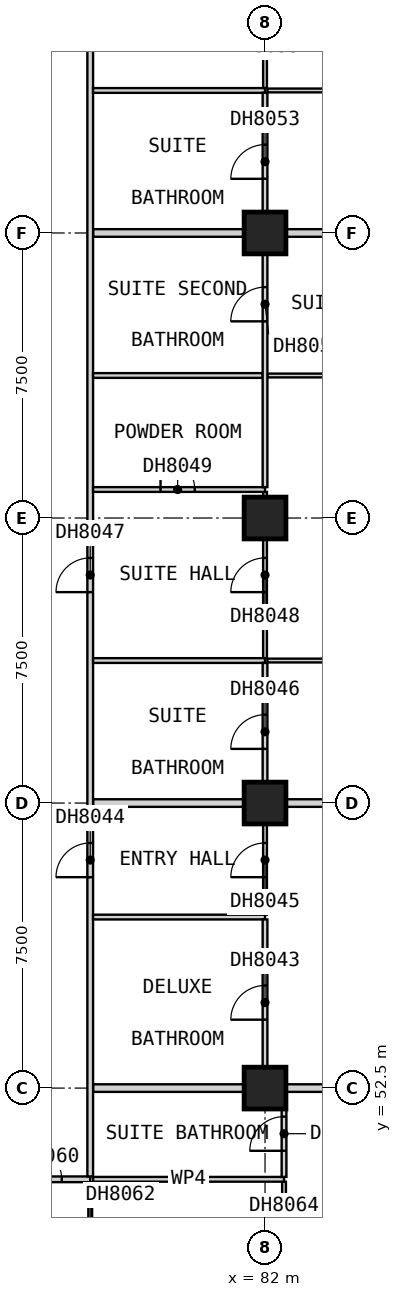
"""IFC4 building model, lengths in metres.
Left out: names, types, materials, properties, quantities, classifications, styles, units other than length and angle.
Written with IfcOpenShell. Run it as: python <this file> out.ifc"""

import sys

from ifc_helpers import new_model, si_unit, direction, frame, frame_2d, origin, origin_2d, place, context, subcontext, project, spatial, rectangle, extrude, element, fill, save


model = new_model("IFC4")
c1 = context("Model", 3, precision=1e-05, world=origin(), true_north=direction((0.0, 1.0)))
c2 = subcontext(c1, "Body", "Model", "MODEL_VIEW")
j1 = project(units=[si_unit("LENGTHUNIT", "METRE"), si_unit("PLANEANGLEUNIT", "RADIAN")], contexts=[c1])
p1 = place(None, origin())
s1 = spatial("IfcSite", under=j1, at=p1, CompositionType="ELEMENT")
p2 = place(p1, origin())
s2 = spatial("IfcBuilding", under=s1, at=p2, CompositionType="ELEMENT")
p3 = place(p2, frame((0.0, 0.0, 89.9)))
s3 = spatial("IfcBuildingStorey", under=s2, at=p3, CompositionType="ELEMENT", Elevation=89.9)
for number, where, z_axis, x_axis in (
    (1, (82.0, 52.5, 0.0), (0.0, 0.0, 1.0), (1.0, 0.0, 0.0)),
    (2, (82.0, 60.0, 0.0), (0.0, 0.0, 1.0), (1.0, 0.0, 0.0)),
    (3, (82.0, 67.5, 0.0), (0.0, 0.0, 1.0), (1.0, 0.0, 0.0)),
    (4, (82.0, 75.0, 0.0), (0.0, 0.0, 1.0), (1.0, 0.0, 0.0)),
):
    element("IfcColumn", number, at=place(p3, frame(where, z_axis=z_axis, x_axis=x_axis)), inside=s3, PredefinedType="COLUMN", context=c2, shape_type="SweptSolid", body=[
        extrude(rectangle(XDim=1.1, YDim=1.1, at=origin_2d()), origin(), (0.0, 0.0, 1.0), 3.6),
    ])
for number, where, z_axis, x_axis in (
    (5, (77.475, 52.5, 0.0), (0.0, 0.0, 1.0), (1.0, 0.0, 0.0)),
    (6, (77.475, 60.0, 0.0), (0.0, 0.0, 1.0), (1.0, 0.0, 0.0)),
    (7, (77.475, 75.0, 0.0), (0.0, 0.0, 1.0), (1.0, 0.0, 0.0)),
):
    element("IfcWall", number, at=place(p3, frame(where, z_axis=z_axis, x_axis=x_axis)), inside=s3, PredefinedType="PARTITIONING", context=c2, shape_type="SweptSolid", body=[
        extrude(rectangle(XDim=12.525, YDim=0.2, at=frame_2d((6.262, 0.0))), origin(), (0.0, 0.0, 1.0), 3.35),
    ])
p4 = place(p3, frame((33.75, 50.1, 0.0), z_axis=(0.0, 0.0, 1.0), x_axis=(1.0, 0.0, 0.0)))
e8 = element("IfcWall", 8, at=p4, inside=s3, PredefinedType="PARTITIONING", context=c2, shape_type="SweptSolid", body=[
    extrude(rectangle(XDim=43.65, YDim=0.15, at=frame_2d((21.825, 0.0))), origin(), (0.0, 0.0, 1.0), 3.35),
])
p5 = place(p4, frame((5.175, 0.0, 0.0)))
e9 = element("IfcOpeningElement", 9, at=p5, cuts=e8, PredefinedType="OPENING", context=c2, shape_type="SweptSolid", body=[
    extrude(rectangle(XDim=0.9, YDim=2.1, at=frame_2d((0.45, 1.05))), frame((0.0, 0.085, 0.0), z_axis=(0.0, -1.0, 0.0), x_axis=(1.0, 0.0, 0.0)), (0.0, 0.0, 1.0), 0.17),
])
p6 = place(p4, frame((13.05, 0.0, 0.0)))
e10 = element("IfcOpeningElement", 10, at=p6, cuts=e8, PredefinedType="OPENING", context=c2, shape_type="SweptSolid", body=[
    extrude(rectangle(XDim=0.9, YDim=2.1, at=frame_2d((0.45, 1.05))), frame((0.0, 0.085, 0.0), z_axis=(0.0, -1.0, 0.0), x_axis=(1.0, 0.0, 0.0)), (0.0, 0.0, 1.0), 0.17),
])
p7 = place(p4, frame((17.363, 0.0, 0.0)))
e11 = element("IfcOpeningElement", 11, at=p7, cuts=e8, PredefinedType="OPENING", context=c2, shape_type="SweptSolid", body=[
    extrude(rectangle(XDim=0.9, YDim=2.1, at=frame_2d((0.45, 1.05))), frame((0.0, 0.085, 0.0), z_axis=(0.0, -1.0, 0.0), x_axis=(1.0, 0.0, 0.0)), (0.0, 0.0, 1.0), 0.17),
])
p8 = place(p4, frame((21.113, 0.0, 0.0)))
e12 = element("IfcOpeningElement", 12, at=p8, cuts=e8, PredefinedType="OPENING", context=c2, shape_type="SweptSolid", body=[
    extrude(rectangle(XDim=0.9, YDim=2.1, at=frame_2d((0.45, 1.05))), frame((0.0, 0.085, 0.0), z_axis=(0.0, -1.0, 0.0), x_axis=(1.0, 0.0, 0.0)), (0.0, 0.0, 1.0), 0.17),
])
p9 = place(p4, frame((28.05, 0.0, 0.0)))
e13 = element("IfcOpeningElement", 13, at=p9, cuts=e8, PredefinedType="OPENING", context=c2, shape_type="SweptSolid", body=[
    extrude(rectangle(XDim=0.9, YDim=2.1, at=frame_2d((0.45, 1.05))), frame((0.0, 0.085, 0.0), z_axis=(0.0, -1.0, 0.0), x_axis=(1.0, 0.0, 0.0)), (0.0, 0.0, 1.0), 0.17),
])
p10 = place(p4, frame((32.363, 0.0, 0.0)))
e14 = element("IfcOpeningElement", 14, at=p10, cuts=e8, PredefinedType="OPENING", context=c2, shape_type="SweptSolid", body=[
    extrude(rectangle(XDim=0.9, YDim=2.1, at=frame_2d((0.45, 1.05))), frame((0.0, 0.085, 0.0), z_axis=(0.0, -1.0, 0.0), x_axis=(1.0, 0.0, 0.0)), (0.0, 0.0, 1.0), 0.17),
])
p11 = place(p4, frame((39.3, 0.0, 0.0)))
e15 = element("IfcOpeningElement", 15, at=p11, cuts=e8, PredefinedType="OPENING", context=c2, shape_type="SweptSolid", body=[
    extrude(rectangle(XDim=0.9, YDim=2.1, at=frame_2d((0.45, 1.05))), frame((0.0, 0.085, 0.0), z_axis=(0.0, -1.0, 0.0), x_axis=(1.0, 0.0, 0.0)), (0.0, 0.0, 1.0), 0.17),
])
p12 = place(p4, frame((42.0, 0.0, 0.0)))
e16 = element("IfcOpeningElement", 16, at=p12, cuts=e8, PredefinedType="OPENING", context=c2, shape_type="SweptSolid", body=[
    extrude(rectangle(XDim=0.9, YDim=2.1, at=frame_2d((0.45, 1.05))), frame((0.0, 0.085, 0.0), z_axis=(0.0, -1.0, 0.0), x_axis=(1.0, 0.0, 0.0)), (0.0, 0.0, 1.0), 0.17),
])
p13 = place(p3, frame((77.4, 50.175, 0.0), z_axis=(0.0, 0.0, 1.0), x_axis=(0.0, 1.0, 0.0)))
e17 = element("IfcWall", 17, at=p13, inside=s3, PredefinedType="PARTITIONING", context=c2, shape_type="SweptSolid", body=[
    extrude(rectangle(XDim=42.15, YDim=0.15, at=frame_2d((21.075, 0.0))), origin(), (0.0, 0.0, 1.0), 3.35),
])
p14 = place(p13, frame((7.875, 0.0, 0.0)))
e18 = element("IfcOpeningElement", 18, at=p14, cuts=e17, PredefinedType="OPENING", context=c2, shape_type="SweptSolid", body=[
    extrude(rectangle(XDim=0.9, YDim=2.1, at=frame_2d((0.45, 1.05))), frame((0.0, 0.085, 0.0), z_axis=(0.0, -1.0, 0.0), x_axis=(1.0, 0.0, 0.0)), (0.0, 0.0, 1.0), 0.17),
])
p15 = place(p13, frame((15.375, 0.0, 0.0)))
e19 = element("IfcOpeningElement", 19, at=p15, cuts=e17, PredefinedType="OPENING", context=c2, shape_type="SweptSolid", body=[
    extrude(rectangle(XDim=0.9, YDim=2.1, at=frame_2d((0.45, 1.05))), frame((0.0, 0.085, 0.0), z_axis=(0.0, -1.0, 0.0), x_axis=(1.0, 0.0, 0.0)), (0.0, 0.0, 1.0), 0.17),
])
p16 = place(p13, frame((30.375, 0.0, 0.0)))
e20 = element("IfcOpeningElement", 20, at=p16, cuts=e17, PredefinedType="OPENING", context=c2, shape_type="SweptSolid", body=[
    extrude(rectangle(XDim=0.9, YDim=2.1, at=frame_2d((0.45, 1.05))), frame((0.0, 0.085, 0.0), z_axis=(0.0, -1.0, 0.0), x_axis=(1.0, 0.0, 0.0)), (0.0, 0.0, 1.0), 0.17),
])
p17 = place(p3, frame((82.062, 63.75, 0.0), z_axis=(0.0, 0.0, 1.0), x_axis=(1.0, 0.0, 0.0)))
e21 = element("IfcWall", 21, at=p17, inside=s3, PredefinedType="PARTITIONING", context=c2, shape_type="SweptSolid", body=[
    extrude(rectangle(XDim=7.127, YDim=0.1, at=frame_2d((3.564, 0.0))), origin(), (0.0, 0.0, 1.0), 3.35),
])
p18 = place(p17, frame((3.488, 0.0, 0.0)))
e22 = element("IfcOpeningElement", 22, at=p18, cuts=e21, PredefinedType="OPENING", context=c2, shape_type="SweptSolid", body=[
    extrude(rectangle(XDim=0.9, YDim=2.1, at=frame_2d((0.45, 1.05))), frame((0.0, 0.06, 0.0), z_axis=(0.0, -1.0, 0.0), x_axis=(1.0, 0.0, 0.0)), (0.0, 0.0, 1.0), 0.12),
])
p19 = place(p3, frame((82.062, 71.25, 0.0), z_axis=(0.0, 0.0, 1.0), x_axis=(1.0, 0.0, 0.0)))
e23 = element("IfcWall", 23, at=p19, inside=s3, PredefinedType="PARTITIONING", context=c2, shape_type="SweptSolid", body=[
    extrude(rectangle(XDim=7.127, YDim=0.1, at=frame_2d((3.564, 0.0))), origin(), (0.0, 0.0, 1.0), 3.35),
])
p20 = place(p19, frame((3.488, 0.0, 0.0)))
e24 = element("IfcOpeningElement", 24, at=p20, cuts=e23, PredefinedType="OPENING", context=c2, shape_type="SweptSolid", body=[
    extrude(rectangle(XDim=0.9, YDim=2.1, at=frame_2d((0.45, 1.05))), frame((0.0, 0.06, 0.0), z_axis=(0.0, -1.0, 0.0), x_axis=(1.0, 0.0, 0.0)), (0.0, 0.0, 1.0), 0.12),
])
p21 = place(p3, frame((82.062, 78.75, 0.0), z_axis=(0.0, 0.0, 1.0), x_axis=(1.0, 0.0, 0.0)))
e25 = element("IfcWall", 25, at=p21, inside=s3, PredefinedType="PARTITIONING", context=c2, shape_type="SweptSolid", body=[
    extrude(rectangle(XDim=7.127, YDim=0.1, at=frame_2d((3.564, 0.0))), origin(), (0.0, 0.0, 1.0), 3.35),
])
p22 = place(p21, frame((3.488, 0.0, 0.0)))
e26 = element("IfcOpeningElement", 26, at=p22, cuts=e25, PredefinedType="OPENING", context=c2, shape_type="SweptSolid", body=[
    extrude(rectangle(XDim=0.9, YDim=2.1, at=frame_2d((0.45, 1.05))), frame((0.0, 0.06, 0.0), z_axis=(0.0, -1.0, 0.0), x_axis=(1.0, 0.0, 0.0)), (0.0, 0.0, 1.0), 0.12),
])
p23 = place(p3, frame((77.4, 46.55, 0.0), z_axis=(0.0, 0.0, 1.0), x_axis=(0.0, 1.0, 0.0)))
e27 = element("IfcWall", 27, at=p23, inside=s3, PredefinedType="PARTITIONING", context=c2, shape_type="SweptSolid", body=[
    extrude(rectangle(XDim=3.475, YDim=0.1, at=frame_2d((1.737, 0.0))), origin(), (0.0, 0.0, 1.0), 3.35),
])
p24 = place(p23, frame((1.3, 0.0, 0.0)))
e28 = element("IfcOpeningElement", 28, at=p24, cuts=e27, PredefinedType="OPENING", context=c2, shape_type="SweptSolid", body=[
    extrude(rectangle(XDim=0.9, YDim=2.1, at=frame_2d((0.45, 1.05))), frame((0.0, 0.06, 0.0), z_axis=(0.0, -1.0, 0.0), x_axis=(1.0, 0.0, 0.0)), (0.0, 0.0, 1.0), 0.12),
])
p25 = place(p3, frame((82.0, 57.062, 0.0), z_axis=(0.0, 0.0, 1.0), x_axis=(0.0, 1.0, 0.0)))
e29 = element("IfcWall", 29, at=p25, inside=s3, PredefinedType="PARTITIONING", context=c2, shape_type="SweptSolid", body=[
    extrude(rectangle(XDim=2.837, YDim=0.1, at=frame_2d((1.419, 0.0))), origin(), (0.0, 0.0, 1.0), 3.35),
])
p26 = place(p25, frame((0.988, 0.0, 0.0)))
e30 = element("IfcOpeningElement", 30, at=p26, cuts=e29, PredefinedType="OPENING", context=c2, shape_type="SweptSolid", body=[
    extrude(rectangle(XDim=0.9, YDim=2.1, at=frame_2d((0.45, 1.05))), frame((0.0, 0.06, 0.0), z_axis=(0.0, -1.0, 0.0), x_axis=(1.0, 0.0, 0.0)), (0.0, 0.0, 1.0), 0.12),
])
p27 = place(p3, frame((82.0, 63.812, 0.0), z_axis=(0.0, 0.0, 1.0), x_axis=(0.0, 1.0, 0.0)))
e31 = element("IfcWall", 31, at=p27, inside=s3, PredefinedType="PARTITIONING", context=c2, shape_type="SweptSolid", body=[
    extrude(rectangle(XDim=4.375, YDim=0.1, at=frame_2d((2.188, 0.0))), origin(), (0.0, 0.0, 1.0), 3.35),
])
p28 = place(p27, frame((1.738, 0.0, 0.0)))
e32 = element("IfcOpeningElement", 32, at=p28, cuts=e31, PredefinedType="OPENING", context=c2, shape_type="SweptSolid", body=[
    extrude(rectangle(XDim=0.9, YDim=2.1, at=frame_2d((0.45, 1.05))), frame((0.0, 0.06, 0.0), z_axis=(0.0, -1.0, 0.0), x_axis=(1.0, 0.0, 0.0)), (0.0, 0.0, 1.0), 0.12),
])
p29 = place(p3, frame((82.0, 78.812, 0.0), z_axis=(0.0, 0.0, 1.0), x_axis=(0.0, 1.0, 0.0)))
e33 = element("IfcWall", 33, at=p29, inside=s3, PredefinedType="PARTITIONING", context=c2, shape_type="SweptSolid", body=[
    extrude(rectangle(XDim=4.375, YDim=0.1, at=frame_2d((2.188, 0.0))), origin(), (0.0, 0.0, 1.0), 3.35),
])
p30 = place(p29, frame((1.738, 0.0, 0.0)))
e34 = element("IfcOpeningElement", 34, at=p30, cuts=e33, PredefinedType="OPENING", context=c2, shape_type="SweptSolid", body=[
    extrude(rectangle(XDim=0.9, YDim=2.1, at=frame_2d((0.45, 1.05))), frame((0.0, 0.06, 0.0), z_axis=(0.0, -1.0, 0.0), x_axis=(1.0, 0.0, 0.0)), (0.0, 0.0, 1.0), 0.12),
])
p31 = place(p3, frame((82.5, 38.31, 0.0), z_axis=(0.0, 0.0, 1.0), x_axis=(0.0, 1.0, 0.0)))
e35 = element("IfcWall", 35, at=p31, inside=s3, PredefinedType="PARTITIONING", context=c2, shape_type="SweptSolid", body=[
    extrude(rectangle(XDim=11.728, YDim=0.1, at=frame_2d((5.864, 0.0))), origin(), (0.0, 0.0, 1.0), 3.35),
])
p32 = place(p31, frame((0.99, 0.0, 0.0)))
e36 = element("IfcOpeningElement", 36, at=p32, cuts=e35, PredefinedType="OPENING", context=c2, shape_type="SweptSolid", body=[
    extrude(rectangle(XDim=0.9, YDim=2.1, at=frame_2d((0.45, 1.05))), frame((0.0, 0.06, 0.0), z_axis=(0.0, -1.0, 0.0), x_axis=(1.0, 0.0, 0.0)), (0.0, 0.0, 1.0), 0.12),
])
p33 = place(p31, frame((9.54, 0.0, 0.0)))
e37 = element("IfcOpeningElement", 37, at=p33, cuts=e35, PredefinedType="OPENING", context=c2, shape_type="SweptSolid", body=[
    extrude(rectangle(XDim=0.9, YDim=2.1, at=frame_2d((0.45, 1.05))), frame((0.0, 0.06, 0.0), z_axis=(0.0, -1.0, 0.0), x_axis=(1.0, 0.0, 0.0)), (0.0, 0.0, 1.0), 0.12),
])
p34 = place(p3, frame((77.475, 50.1, 0.0), z_axis=(0.0, 0.0, 1.0), x_axis=(1.0, 0.0, 0.0)))
e38 = element("IfcWall", 38, at=p34, inside=s3, PredefinedType="PARTITIONING", context=c2, shape_type="SweptSolid", body=[
    extrude(rectangle(XDim=5.025, YDim=0.125, at=frame_2d((2.512, 0.0))), origin(), (0.0, 0.0, 1.0), 3.35),
])
for number, where, z_axis, x_axis in (
    (39, (77.475, 57.0, 0.0), (0.0, 0.0, 1.0), (1.0, 0.0, 0.0)),
    (40, (77.475, 63.75, 0.0), (0.0, 0.0, 1.0), (1.0, 0.0, 0.0)),
):
    element("IfcWall", number, at=place(p3, frame(where, z_axis=z_axis, x_axis=x_axis)), inside=s3, PredefinedType="PARTITIONING", context=c2, shape_type="SweptSolid", body=[
        extrude(rectangle(XDim=4.525, YDim=0.125, at=frame_2d((2.262, 0.0))), origin(), (0.0, 0.0, 1.0), 3.35),
    ])
p35 = place(p3, frame((77.475, 68.25, 0.0), z_axis=(0.0, 0.0, 1.0), x_axis=(1.0, 0.0, 0.0)))
e41 = element("IfcWall", 41, at=p35, inside=s3, PredefinedType="PARTITIONING", context=c2, shape_type="SweptSolid", body=[
    extrude(rectangle(XDim=4.525, YDim=0.125, at=frame_2d((2.262, 0.0))), origin(), (0.0, 0.0, 1.0), 3.35),
])
p36 = place(p35, frame((1.775, 0.0, 0.0)))
e42 = element("IfcOpeningElement", 42, at=p36, cuts=e41, PredefinedType="OPENING", context=c2, shape_type="SweptSolid", body=[
    extrude(rectangle(XDim=0.9, YDim=2.1, at=frame_2d((0.45, 1.05))), frame((0.0, 0.073, 0.0), z_axis=(0.0, -1.0, 0.0), x_axis=(1.0, 0.0, 0.0)), (0.0, 0.0, 1.0), 0.145),
])
p37 = place(p3, frame((77.475, 71.25, 0.0), z_axis=(0.0, 0.0, 1.0), x_axis=(1.0, 0.0, 0.0)))
e43 = element("IfcWall", 43, at=p37, inside=s3, PredefinedType="PARTITIONING", context=c2, shape_type="SweptSolid", body=[
    extrude(rectangle(XDim=4.462, YDim=0.125, at=frame_2d((2.231, 0.0))), origin(), (0.0, 0.0, 1.0), 3.35),
])
p38 = place(p3, frame((77.475, 78.75, 0.0), z_axis=(0.0, 0.0, 1.0), x_axis=(1.0, 0.0, 0.0)))
e44 = element("IfcWall", 44, at=p38, inside=s3, PredefinedType="PARTITIONING", context=c2, shape_type="SweptSolid", body=[
    extrude(rectangle(XDim=4.525, YDim=0.125, at=frame_2d((2.262, 0.0))), origin(), (0.0, 0.0, 1.0), 3.35),
])
p39 = place(p3, frame((82.0, 52.6, 0.0), z_axis=(0.0, 0.0, 1.0), x_axis=(0.0, 1.0, 0.0)))
e45 = element("IfcWall", 45, at=p39, inside=s3, PredefinedType="PARTITIONING", context=c2, shape_type="SweptSolid", body=[
    extrude(rectangle(XDim=4.337, YDim=0.125, at=frame_2d((2.169, 0.0))), origin(), (0.0, 0.0, 1.0), 3.35),
])
p40 = place(p39, frame((1.7, 0.0, 0.0)))
e46 = element("IfcOpeningElement", 46, at=p40, cuts=e45, PredefinedType="OPENING", context=c2, shape_type="SweptSolid", body=[
    extrude(rectangle(XDim=0.9, YDim=2.1, at=frame_2d((0.45, 1.05))), frame((0.0, 0.073, 0.0), z_axis=(0.0, -1.0, 0.0), x_axis=(1.0, 0.0, 0.0)), (0.0, 0.0, 1.0), 0.145),
])
p41 = place(p3, frame((82.0, 60.1, 0.0), z_axis=(0.0, 0.0, 1.0), x_axis=(0.0, 1.0, 0.0)))
e47 = element("IfcWall", 47, at=p41, inside=s3, PredefinedType="PARTITIONING", context=c2, shape_type="SweptSolid", body=[
    extrude(rectangle(XDim=3.587, YDim=0.125, at=frame_2d((1.794, 0.0))), origin(), (0.0, 0.0, 1.0), 3.35),
])
p42 = place(p41, frame((1.325, 0.0, 0.0)))
e48 = element("IfcOpeningElement", 48, at=p42, cuts=e47, PredefinedType="OPENING", context=c2, shape_type="SweptSolid", body=[
    extrude(rectangle(XDim=0.9, YDim=2.1, at=frame_2d((0.45, 1.05))), frame((0.0, 0.073, 0.0), z_axis=(0.0, -1.0, 0.0), x_axis=(1.0, 0.0, 0.0)), (0.0, 0.0, 1.0), 0.145),
])
p43 = place(p3, frame((82.0, 68.312, 0.0), z_axis=(0.0, 0.0, 1.0), x_axis=(0.0, 1.0, 0.0)))
e49 = element("IfcWall", 49, at=p43, inside=s3, PredefinedType="PARTITIONING", context=c2, shape_type="SweptSolid", body=[
    extrude(rectangle(XDim=10.375, YDim=0.125, at=frame_2d((5.188, 0.0))), origin(), (0.0, 0.0, 1.0), 3.35),
])
p44 = place(p43, frame((4.363, 0.0, 0.0)))
e50 = element("IfcOpeningElement", 50, at=p44, cuts=e49, PredefinedType="OPENING", context=c2, shape_type="SweptSolid", body=[
    extrude(rectangle(XDim=0.9, YDim=2.1, at=frame_2d((0.45, 1.05))), frame((0.0, 0.073, 0.0), z_axis=(0.0, -1.0, 0.0), x_axis=(1.0, 0.0, 0.0)), (0.0, 0.0, 1.0), 0.145),
])
p45 = place(p43, frame((8.113, 0.0, 0.0)))
e51 = element("IfcOpeningElement", 51, at=p45, cuts=e49, PredefinedType="OPENING", context=c2, shape_type="SweptSolid", body=[
    extrude(rectangle(XDim=0.9, YDim=2.1, at=frame_2d((0.45, 1.05))), frame((0.0, 0.073, 0.0), z_axis=(0.0, -1.0, 0.0), x_axis=(1.0, 0.0, 0.0)), (0.0, 0.0, 1.0), 0.145),
])
p46 = place(p3, frame((82.5, 50.163, 0.0), z_axis=(0.0, 0.0, 1.0), x_axis=(0.0, 1.0, 0.0)))
e52 = element("IfcWall", 52, at=p46, inside=s3, PredefinedType="PARTITIONING", context=c2, shape_type="SweptSolid", body=[
    extrude(rectangle(XDim=2.237, YDim=0.125, at=frame_2d((1.119, 0.0))), origin(), (0.0, 0.0, 1.0), 3.35),
])
p47 = place(p46, frame((0.688, 0.0, 0.0)))
e53 = element("IfcOpeningElement", 53, at=p47, cuts=e52, PredefinedType="OPENING", context=c2, shape_type="SweptSolid", body=[
    extrude(rectangle(XDim=0.9, YDim=2.1, at=frame_2d((0.45, 1.05))), frame((0.0, 0.073, 0.0), z_axis=(0.0, -1.0, 0.0), x_axis=(1.0, 0.0, 0.0)), (0.0, 0.0, 1.0), 0.145),
])
p48 = place(p40, origin())
e54 = element("IfcDoor", 54, at=p48, inside=s3, OperationType="SINGLE_SWING_LEFT", PredefinedType="DOOR", context=c2, shape_type="SweptSolid", body=[
    extrude(rectangle(XDim=0.9, YDim=2.1, at=frame_2d((0.45, 1.05))), frame((0.0, 0.025, 0.0), z_axis=(0.0, -1.0, 0.0), x_axis=(1.0, 0.0, 0.0)), (0.0, 0.0, 1.0), 0.05),
])
fill(e46, e54)
p49 = place(p14, origin())
e55 = element("IfcDoor", 55, at=p49, inside=s3, OperationType="SINGLE_SWING_RIGHT", PredefinedType="DOOR", context=c2, shape_type="SweptSolid", body=[
    extrude(rectangle(XDim=0.9, YDim=2.1, at=frame_2d((0.45, 1.05))), frame((0.0, 0.025, 0.0), z_axis=(0.0, -1.0, 0.0), x_axis=(1.0, 0.0, 0.0)), (0.0, 0.0, 1.0), 0.05),
])
fill(e18, e55)
p50 = place(p26, origin())
e56 = element("IfcDoor", 56, at=p50, inside=s3, OperationType="SINGLE_SWING_LEFT", PredefinedType="DOOR", context=c2, shape_type="SweptSolid", body=[
    extrude(rectangle(XDim=0.9, YDim=2.1, at=frame_2d((0.45, 1.05))), frame((0.0, 0.025, 0.0), z_axis=(0.0, -1.0, 0.0), x_axis=(1.0, 0.0, 0.0)), (0.0, 0.0, 1.0), 0.05),
])
fill(e30, e56)
p51 = place(p42, origin())
e57 = element("IfcDoor", 57, at=p51, inside=s3, OperationType="SINGLE_SWING_LEFT", PredefinedType="DOOR", context=c2, shape_type="SweptSolid", body=[
    extrude(rectangle(XDim=0.9, YDim=2.1, at=frame_2d((0.45, 1.05))), frame((0.0, 0.025, 0.0), z_axis=(0.0, -1.0, 0.0), x_axis=(1.0, 0.0, 0.0)), (0.0, 0.0, 1.0), 0.05),
])
fill(e48, e57)
p52 = place(p15, origin())
e58 = element("IfcDoor", 58, at=p52, inside=s3, OperationType="SINGLE_SWING_RIGHT", PredefinedType="DOOR", context=c2, shape_type="SweptSolid", body=[
    extrude(rectangle(XDim=0.9, YDim=2.1, at=frame_2d((0.45, 1.05))), frame((0.0, 0.025, 0.0), z_axis=(0.0, -1.0, 0.0), x_axis=(1.0, 0.0, 0.0)), (0.0, 0.0, 1.0), 0.05),
])
fill(e19, e58)
p53 = place(p28, origin())
e59 = element("IfcDoor", 59, at=p53, inside=s3, OperationType="SINGLE_SWING_LEFT", PredefinedType="DOOR", context=c2, shape_type="SweptSolid", body=[
    extrude(rectangle(XDim=0.9, YDim=2.1, at=frame_2d((0.45, 1.05))), frame((0.0, 0.025, 0.0), z_axis=(0.0, -1.0, 0.0), x_axis=(1.0, 0.0, 0.0)), (0.0, 0.0, 1.0), 0.05),
])
fill(e32, e59)
p54 = place(p36, origin())
e60 = element("IfcDoor", 60, at=p54, inside=s3, OperationType="SINGLE_SWING_RIGHT", PredefinedType="DOOR", context=c2, shape_type="SweptSolid", body=[
    extrude(rectangle(XDim=0.9, YDim=2.1, at=frame_2d((0.45, 1.05))), frame((0.0, 0.025, 0.0), z_axis=(0.0, -1.0, 0.0), x_axis=(1.0, 0.0, 0.0)), (0.0, 0.0, 1.0), 0.05),
])
fill(e42, e60)
p55 = place(p44, origin())
e61 = element("IfcDoor", 61, at=p55, inside=s3, OperationType="SINGLE_SWING_LEFT", PredefinedType="DOOR", context=c2, shape_type="SweptSolid", body=[
    extrude(rectangle(XDim=0.9, YDim=2.1, at=frame_2d((0.45, 1.05))), frame((0.0, 0.025, 0.0), z_axis=(0.0, -1.0, 0.0), x_axis=(1.0, 0.0, 0.0)), (0.0, 0.0, 1.0), 0.05),
])
fill(e50, e61)
p56 = place(p45, origin())
e62 = element("IfcDoor", 62, at=p56, inside=s3, OperationType="SINGLE_SWING_LEFT", PredefinedType="DOOR", context=c2, shape_type="SweptSolid", body=[
    extrude(rectangle(XDim=0.9, YDim=2.1, at=frame_2d((0.45, 1.05))), frame((0.0, 0.025, 0.0), z_axis=(0.0, -1.0, 0.0), x_axis=(1.0, 0.0, 0.0)), (0.0, 0.0, 1.0), 0.05),
])
fill(e51, e62)
p57 = place(p12, origin())
e63 = element("IfcDoor", 63, at=p57, inside=s3, OperationType="SINGLE_SWING_LEFT", PredefinedType="DOOR", context=c2, shape_type="SweptSolid", body=[
    extrude(rectangle(XDim=0.9, YDim=2.1, at=frame_2d((0.45, 1.05))), frame((0.0, 0.025, 0.0), z_axis=(0.0, -1.0, 0.0), x_axis=(1.0, 0.0, 0.0)), (0.0, 0.0, 1.0), 0.05),
])
fill(e16, e63)
p58 = place(p47, origin())
e64 = element("IfcDoor", 64, at=p58, inside=s3, OperationType="SINGLE_SWING_LEFT", PredefinedType="DOOR", context=c2, shape_type="SweptSolid", body=[
    extrude(rectangle(XDim=0.9, YDim=2.1, at=frame_2d((0.45, 1.05))), frame((0.0, 0.025, 0.0), z_axis=(0.0, -1.0, 0.0), x_axis=(1.0, 0.0, 0.0)), (0.0, 0.0, 1.0), 0.05),
])
fill(e53, e64)
save(model, sys.argv[1])
